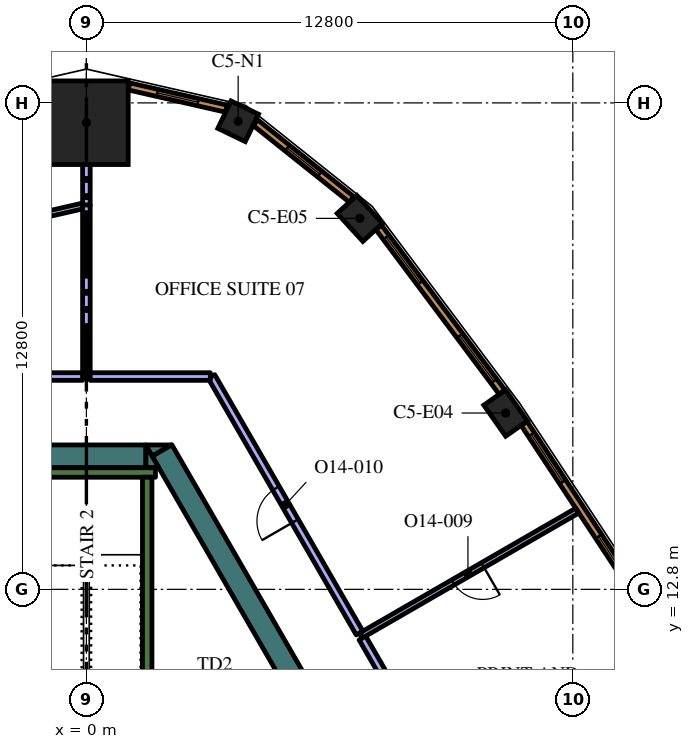
"""IFC4 building model, lengths in metres.
Left out: names, types, materials, properties, quantities, classifications, styles, units other than length and angle.
Written with IfcOpenShell. Run it as: python <this file> out.ifc"""

import sys

from ifc_helpers import new_model, si_unit, direction, frame, frame_2d, origin, origin_2d, place, context, subcontext, project, spatial, polyline, rectangle, outline, extrude, element, fill, save


model = new_model("IFC4")
c1 = context("Model", 3, precision=1e-05, world=origin(), true_north=direction((0.0, 1.0)))
c2 = subcontext(c1, "Body", "Model", "MODEL_VIEW")
j1 = project(units=[si_unit("LENGTHUNIT", "METRE"), si_unit("PLANEANGLEUNIT", "RADIAN")], contexts=[c1])
p1 = place(None, origin())
s1 = spatial("IfcSite", under=j1, at=p1, CompositionType="ELEMENT")
p2 = place(p1, origin())
s2 = spatial("IfcBuilding", under=s1, at=p2, CompositionType="ELEMENT")
p3 = place(p2, frame((0.0, 0.0, 313.2)))
s3 = spatial("IfcBuildingStorey", under=s2, at=p3, CompositionType="ELEMENT", Elevation=313.2)
p4 = place(p3, frame((0.0, 25.078, 0.0), z_axis=(0.0, 0.0, 1.0), x_axis=(0.0, 1.0, 0.0)))
e1 = element("IfcColumn", 1, at=p4, inside=s3, PredefinedType="COLUMN", context=c2, shape_type="SweptSolid", body=[
    extrude(rectangle(XDim=2.2, YDim=2.2, at=origin_2d()), origin(), (0.0, 0.0, 1.0), 4.2),
])
for number, where, z_axis, x_axis in (
    (2, (11.032, 17.44, 0.0), (0.0, 0.0, 1.0), (-0.575, 0.818, 0.0)),
    (3, (7.195, 22.561, 0.0), (0.0, 0.0, 1.0), (-0.676, 0.737, 0.0)),
):
    element("IfcColumn", number, at=place(p3, frame(where, z_axis=z_axis, x_axis=x_axis)), inside=s3, PredefinedType="COLUMN", context=c2, shape_type="SweptSolid", body=[
        extrude(rectangle(XDim=1.0, YDim=0.7, at=origin_2d()), origin(), (0.0, 0.0, 1.0), 4.2),
    ])
p5 = place(p3, frame((3.993, 25.116, 0.0), z_axis=(0.0, 0.0, 1.0), x_axis=(-0.900873321869, 0.434082086644, 0.0)))
e4 = element("IfcColumn", 4, at=p5, inside=s3, PredefinedType="COLUMN", context=c2, shape_type="SweptSolid", body=[
    extrude(rectangle(XDim=0.8, YDim=0.8, at=origin_2d()), origin(), (0.0, 0.0, 1.0), 4.2),
])
p6 = place(p3, frame((1.989, 16.456, 0.0), z_axis=(0.0, 0.0, 1.0), x_axis=(0.49999102663, -0.8660305845, 0.0)))
e5 = element("IfcWall", 5, at=p6, inside=s3, PredefinedType="SOLIDWALL", context=c2, shape_type="SweptSolid", body=[
    extrude(rectangle(XDim=12.406, YDim=0.6, at=frame_2d((6.203, 0.0))), origin(), (0.0, 0.0, 1.0), 4.2),
])
p7 = place(p3, origin())
e6 = element("IfcWall", 6, at=p7, inside=s3, PredefinedType="SOLIDWALL", context=c2, shape_type="SweptSolid", body=[
    extrude(outline(polyline([(1.559, 16.6), (2.235, 16.6), (1.728, 16.307), (1.559, 16.6)])), origin(), (0.0, 0.0, 1.0), 4.2),
])
p8 = place(p3, frame((-2.258, 16.3, 0.0), z_axis=(0.0, 0.0, 1.0), x_axis=(1.0, 0.0, 0.0)))
e7 = element("IfcWall", 7, at=p8, inside=s3, PredefinedType="SOLIDWALL", context=c2, shape_type="SweptSolid", body=[
    extrude(rectangle(XDim=3.823, YDim=0.6, at=frame_2d((1.912, 0.0))), origin(), (0.0, 0.0, 1.0), 4.2),
])
e8 = element("IfcWall", 8, at=p7, inside=s3, PredefinedType="SOLIDWALL", context=c2, shape_type="SweptSolid", body=[
    extrude(outline(polyline([(1.905, 16.0), (1.567, 16.0), (1.567, 16.585), (1.905, 16.0)])), origin(), (0.0, 0.0, 1.0), 4.2),
])
p9 = place(p3, frame((-1.817, 15.875, 0.0), z_axis=(0.0, 0.0, 1.0), x_axis=(1.0, 0.0, 0.0)))
e9 = element("IfcWall", 9, at=p9, inside=s3, PredefinedType="SOLIDWALL", context=c2, shape_type="SweptSolid", body=[
    extrude(rectangle(XDim=3.634, YDim=0.25, at=frame_2d((1.817, 0.0))), origin(), (0.0, 0.0, 1.0), 4.2),
])
p10 = place(p3, frame((1.6, 8.95, 0.0), z_axis=(0.0, 0.0, 1.0), x_axis=(0.0, 1.0, 0.0)))
e10 = element("IfcWall", 10, at=p10, inside=s3, PredefinedType="SOLIDWALL", context=c2, shape_type="SweptSolid", body=[
    extrude(rectangle(XDim=6.8, YDim=0.25, at=frame_2d((3.4, 0.0))), origin(), (0.0, 0.0, 1.0), 4.2),
])
p11 = place(p3, frame((12.918, 14.872, 0.0), z_axis=(0.0, 0.0, 1.0), x_axis=(-0.866033427365, -0.499986102494, 0.0)))
e11 = element("IfcWall", 11, at=p11, inside=s3, PredefinedType="PARTITIONING", context=c2, shape_type="SweptSolid", body=[
    extrude(rectangle(XDim=6.573, YDim=0.15, at=frame_2d((3.287, 0.0))), origin(), (0.0, 0.0, 1.0), 3.55),
])
p12 = place(p11, frame((2.873, 0.0, 0.0)))
e12 = element("IfcOpeningElement", 12, at=p12, cuts=e11, PredefinedType="OPENING", context=c2, shape_type="SweptSolid", body=[
    extrude(rectangle(XDim=0.9, YDim=2.1, at=frame_2d((0.45, 1.05))), frame((0.0, 0.085, 0.0), z_axis=(0.0, -1.0, 0.0), x_axis=(1.0, 0.0, 0.0)), (0.0, 0.0, 1.0), 0.17),
])
p13 = place(p3, frame((8.171, 9.948, 0.0), z_axis=(0.0, 0.0, 1.0), x_axis=(-0.500044545065, 0.865999684151, 0.0)))
e13 = element("IfcWall", 13, at=p13, inside=s3, PredefinedType="PARTITIONING", context=c2, shape_type="SweptSolid", body=[
    extrude(rectangle(XDim=1.815, YDim=0.2, at=frame_2d((0.908, 0.0))), origin(), (0.0, 0.0, 1.0), 3.55),
])
p14 = place(p3, frame((0.0, 22.906, 0.0), z_axis=(0.0, 0.0, 1.0), x_axis=(0.0, 1.0, 0.0)))
e14 = element("IfcWall", 14, at=p14, inside=s3, PredefinedType="PARTITIONING", context=c2, shape_type="SweptSolid", body=[
    extrude(rectangle(XDim=1.072, YDim=0.2, at=frame_2d((0.536, 0.0))), origin(), (0.0, 0.0, 1.0), 3.55),
])
p15 = place(p3, frame((0.0, 18.4, 0.0), z_axis=(0.0, 0.0, 1.0), x_axis=(0.0, 1.0, 0.0)))
e15 = element("IfcWall", 15, at=p15, inside=s3, PredefinedType="PARTITIONING", context=c2, shape_type="SweptSolid", body=[
    extrude(rectangle(XDim=4.514, YDim=0.2, at=frame_2d((2.257, 0.0))), origin(), (0.0, 0.0, 1.0), 3.55),
])
p16 = place(p3, frame((7.188, 11.65, 0.0), z_axis=(0.0, 0.0, 1.0), x_axis=(-0.499986368499, 0.866033273792, 0.0)))
e16 = element("IfcWall", 16, at=p16, inside=s3, PredefinedType="PARTITIONING", context=c2, shape_type="SweptSolid", body=[
    extrude(rectangle(XDim=7.794, YDim=0.2, at=frame_2d((3.897, 0.0))), origin(), (0.0, 0.0, 1.0), 3.55),
])
p17 = place(p16, frame((3.4, 0.0, 0.0)))
e17 = element("IfcOpeningElement", 17, at=p17, cuts=e16, PredefinedType="OPENING", context=c2, shape_type="SweptSolid", body=[
    extrude(rectangle(XDim=1.0, YDim=2.1, at=frame_2d((0.5, 1.05))), frame((0.0, 0.11, 0.0), z_axis=(0.0, -1.0, 0.0), x_axis=(1.0, 0.0, 0.0)), (0.0, 0.0, 1.0), 0.22),
])
p18 = place(p3, frame((3.261, 18.4, 0.0), z_axis=(0.0, 0.0, 1.0), x_axis=(-1.0, 0.0, 0.0)))
e18 = element("IfcWall", 18, at=p18, inside=s3, PredefinedType="PARTITIONING", context=c2, shape_type="SweptSolid", body=[
    extrude(rectangle(XDim=3.161, YDim=0.2, at=frame_2d((1.581, 0.0))), origin(), (0.0, 0.0, 1.0), 3.55),
])
p19 = place(p3, frame((-0.1, 22.887, 0.0), z_axis=(0.0, 0.0, 1.0), x_axis=(-0.974895716418, -0.222661945805, 0.0)))
e19 = element("IfcWall", 19, at=p19, inside=s3, PredefinedType="PARTITIONING", context=c2, shape_type="SweptSolid", body=[
    extrude(rectangle(XDim=2.605, YDim=0.15, at=frame_2d((1.303, 0.0))), origin(), (0.0, 0.0, 1.0), 3.55),
])
p20 = place(p3, frame((-0.1, 18.4, 0.0), z_axis=(0.0, 0.0, 1.0), x_axis=(-1.0, 0.0, 0.0)))
e20 = element("IfcWall", 20, at=p20, inside=s3, PredefinedType="PARTITIONING", context=c2, shape_type="SweptSolid", body=[
    extrude(rectangle(XDim=3.191, YDim=0.2, at=frame_2d((1.595, 0.0))), origin(), (0.0, 0.0, 1.0), 3.55),
])
p21 = place(p3, frame((14.496, 12.653, 0.0), z_axis=(0.0, 0.0, 1.0), x_axis=(-0.550744054781, 0.83467417962, 0.0)))
e21 = element("IfcWall", 21, at=p21, inside=s3, PredefinedType="SOLIDWALL", context=c2, shape_type="SweptSolid", body=[
    extrude(rectangle(XDim=5.406, YDim=0.19, at=frame_2d((2.703, 0.0))), origin(), (0.0, 0.0, 1.0), 3.95),
])
p22 = place(p21, frame((0.346, 0.0, 0.6)))
e22 = element("IfcOpeningElement", 22, at=p22, cuts=e21, PredefinedType="OPENING", context=c2, shape_type="SweptSolid", body=[
    extrude(rectangle(XDim=1.5, YDim=2.85, at=frame_2d((0.75, 1.425))), frame((0.0, 0.105, 0.0), z_axis=(0.0, -1.0, 0.0), x_axis=(1.0, 0.0, 0.0)), (0.0, 0.0, 1.0), 0.21),
])
p23 = place(p21, frame((3.559, 0.0, 0.6)))
e23 = element("IfcOpeningElement", 23, at=p23, cuts=e21, PredefinedType="OPENING", context=c2, shape_type="SweptSolid", body=[
    extrude(rectangle(XDim=1.5, YDim=2.85, at=frame_2d((0.75, 1.425))), frame((0.0, 0.105, 0.0), z_axis=(0.0, -1.0, 0.0), x_axis=(1.0, 0.0, 0.0)), (0.0, 0.0, 1.0), 0.21),
])
p24 = place(p3, frame((10.938, 17.99, 0.0), z_axis=(0.0, 0.0, 1.0), x_axis=(-0.599559865294, 0.800329911929, 0.0)))
e24 = element("IfcWall", 24, at=p24, inside=s3, PredefinedType="SOLIDWALL", context=c2, shape_type="SweptSolid", body=[
    extrude(rectangle(XDim=5.415, YDim=0.19, at=frame_2d((2.708, 0.0))), origin(), (0.0, 0.0, 1.0), 3.95),
])
p25 = place(p24, frame((0.358, 0.0, 0.6)))
e25 = element("IfcOpeningElement", 25, at=p25, cuts=e24, PredefinedType="OPENING", context=c2, shape_type="SweptSolid", body=[
    extrude(rectangle(XDim=1.5, YDim=2.85, at=frame_2d((0.75, 1.425))), frame((0.0, 0.105, 0.0), z_axis=(0.0, -1.0, 0.0), x_axis=(1.0, 0.0, 0.0)), (0.0, 0.0, 1.0), 0.21),
])
p26 = place(p24, frame((3.593, 0.0, 0.6)))
e26 = element("IfcOpeningElement", 26, at=p26, cuts=e24, PredefinedType="OPENING", context=c2, shape_type="SweptSolid", body=[
    extrude(rectangle(XDim=1.5, YDim=2.85, at=frame_2d((0.75, 1.425))), frame((0.0, 0.105, 0.0), z_axis=(0.0, -1.0, 0.0), x_axis=(1.0, 0.0, 0.0)), (0.0, 0.0, 1.0), 0.21),
])
p27 = place(p3, frame((6.977, 23.061, 0.0), z_axis=(0.0, 0.0, 1.0), x_axis=(-0.781626234064, 0.623747088349, 0.0)))
e27 = element("IfcWall", 27, at=p27, inside=s3, PredefinedType="SOLIDWALL", context=c2, shape_type="SweptSolid", body=[
    extrude(rectangle(XDim=3.237, YDim=0.19, at=frame_2d((1.618, 0.0))), origin(), (0.0, 0.0, 1.0), 3.95),
])
p28 = place(p27, frame((1.068, 0.0, 0.6)))
e28 = element("IfcOpeningElement", 28, at=p28, cuts=e27, PredefinedType="OPENING", context=c2, shape_type="SweptSolid", body=[
    extrude(rectangle(XDim=1.1, YDim=2.85, at=frame_2d((0.55, 1.425))), frame((0.0, 0.105, 0.0), z_axis=(0.0, -1.0, 0.0), x_axis=(1.0, 0.0, 0.0)), (0.0, 0.0, 1.0), 0.21),
])
p29 = place(p3, frame((3.683, 25.449, 0.0), z_axis=(0.0, 0.0, 1.0), x_axis=(-0.974913273386, 0.222585060988, 0.0)))
e29 = element("IfcWall", 29, at=p29, inside=s3, PredefinedType="SOLIDWALL", context=c2, shape_type="SweptSolid", body=[
    extrude(rectangle(XDim=2.627, YDim=0.19, at=frame_2d((1.313, 0.0))), origin(), (0.0, 0.0, 1.0), 3.95),
])
p30 = place(p29, frame((0.763, 0.0, 0.6)))
e30 = element("IfcOpeningElement", 30, at=p30, cuts=e29, PredefinedType="OPENING", context=c2, shape_type="SweptSolid", body=[
    extrude(rectangle(XDim=1.1, YDim=2.85, at=frame_2d((0.55, 1.425))), frame((0.0, 0.105, 0.0), z_axis=(0.0, -1.0, 0.0), x_axis=(1.0, 0.0, 0.0)), (0.0, 0.0, 1.0), 0.21),
])
p31 = place(p12, origin())
e31 = element("IfcDoor", 31, at=p31, inside=s3, OperationType="SINGLE_SWING_RIGHT", PredefinedType="DOOR", context=c2, shape_type="SweptSolid", body=[
    extrude(rectangle(XDim=0.9, YDim=2.1, at=frame_2d((0.45, 1.05))), frame((0.0, 0.025, 0.0), z_axis=(0.0, -1.0, 0.0), x_axis=(1.0, 0.0, 0.0)), (0.0, 0.0, 1.0), 0.05),
])
fill(e12, e31)
p32 = place(p17, origin())
e32 = element("IfcDoor", 32, at=p32, inside=s3, OperationType="SINGLE_SWING_RIGHT", PredefinedType="DOOR", context=c2, shape_type="SweptSolid", body=[
    extrude(rectangle(XDim=1.0, YDim=2.1, at=frame_2d((0.5, 1.05))), frame((0.0, 0.025, 0.0), z_axis=(0.0, -1.0, 0.0), x_axis=(1.0, 0.0, 0.0)), (0.0, 0.0, 1.0), 0.05),
])
fill(e17, e32)
p33 = place(p22, origin())
e33 = element("IfcWindow", 33, at=p33, inside=s3, PartitioningType="SINGLE_PANEL", PredefinedType="WINDOW", context=c2, shape_type="SweptSolid", body=[
    extrude(rectangle(XDim=1.5, YDim=2.85, at=frame_2d((0.75, 1.425))), frame((0.0, 0.045, 0.0), z_axis=(0.0, -1.0, 0.0), x_axis=(1.0, 0.0, 0.0)), (0.0, 0.0, 1.0), 0.06),
])
fill(e22, e33)
p34 = place(p23, origin())
e34 = element("IfcWindow", 34, at=p34, inside=s3, PartitioningType="SINGLE_PANEL", PredefinedType="WINDOW", context=c2, shape_type="SweptSolid", body=[
    extrude(rectangle(XDim=1.5, YDim=2.85, at=frame_2d((0.75, 1.425))), frame((0.0, 0.045, 0.0), z_axis=(0.0, -1.0, 0.0), x_axis=(1.0, 0.0, 0.0)), (0.0, 0.0, 1.0), 0.06),
])
fill(e23, e34)
p35 = place(p25, origin())
e35 = element("IfcWindow", 35, at=p35, inside=s3, PartitioningType="SINGLE_PANEL", PredefinedType="WINDOW", context=c2, shape_type="SweptSolid", body=[
    extrude(rectangle(XDim=1.5, YDim=2.85, at=frame_2d((0.75, 1.425))), frame((0.0, 0.045, 0.0), z_axis=(0.0, -1.0, 0.0), x_axis=(1.0, 0.0, 0.0)), (0.0, 0.0, 1.0), 0.06),
])
fill(e25, e35)
p36 = place(p26, origin())
e36 = element("IfcWindow", 36, at=p36, inside=s3, PartitioningType="SINGLE_PANEL", PredefinedType="WINDOW", context=c2, shape_type="SweptSolid", body=[
    extrude(rectangle(XDim=1.5, YDim=2.85, at=frame_2d((0.75, 1.425))), frame((0.0, 0.045, 0.0), z_axis=(0.0, -1.0, 0.0), x_axis=(1.0, 0.0, 0.0)), (0.0, 0.0, 1.0), 0.06),
])
fill(e26, e36)
p37 = place(p28, origin())
e37 = element("IfcWindow", 37, at=p37, inside=s3, PartitioningType="SINGLE_PANEL", PredefinedType="WINDOW", context=c2, shape_type="SweptSolid", body=[
    extrude(rectangle(XDim=1.1, YDim=2.85, at=frame_2d((0.55, 1.425))), frame((0.0, 0.045, 0.0), z_axis=(0.0, -1.0, 0.0), x_axis=(1.0, 0.0, 0.0)), (0.0, 0.0, 1.0), 0.06),
])
fill(e28, e37)
p38 = place(p30, origin())
e38 = element("IfcWindow", 38, at=p38, inside=s3, PartitioningType="SINGLE_PANEL", PredefinedType="WINDOW", context=c2, shape_type="SweptSolid", body=[
    extrude(rectangle(XDim=1.1, YDim=2.85, at=frame_2d((0.55, 1.425))), frame((0.0, 0.045, 0.0), z_axis=(0.0, -1.0, 0.0), x_axis=(1.0, 0.0, 0.0)), (0.0, 0.0, 1.0), 0.06),
])
fill(e30, e38)
save(model, sys.argv[1])
